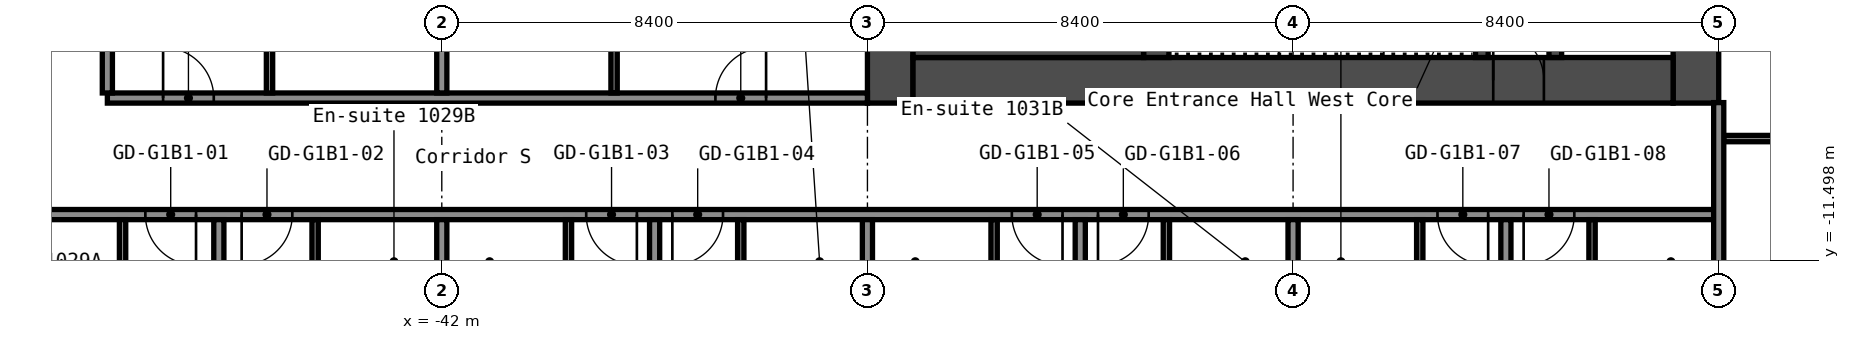
"""IFC4 building model, lengths in metres.
Left out: names, types, materials, properties, quantities, classifications, styles, units other than length and angle.
Written with IfcOpenShell. Run it as: python <this file> out.ifc"""

import sys

from ifc_helpers import new_model, si_unit, direction, frame, frame_2d, origin, place, context, subcontext, project, spatial, rectangle, extrude, element, fill, save


model = new_model("IFC4")
c1 = context("Model", 3, precision=1e-05, world=origin(), true_north=direction((0.0, 1.0)))
c2 = subcontext(c1, "Body", "Model", "MODEL_VIEW")
j1 = project(units=[si_unit("LENGTHUNIT", "METRE"), si_unit("PLANEANGLEUNIT", "RADIAN")], contexts=[c1])
p1 = place(None, origin())
s1 = spatial("IfcSite", under=j1, at=p1, CompositionType="ELEMENT")
p2 = place(p1, origin())
s2 = spatial("IfcBuilding", under=s1, at=p2, CompositionType="ELEMENT")
p3 = place(p2, frame((0.0, 0.0, 39.0)))
s3 = spatial("IfcBuildingStorey", under=s2, at=p3, CompositionType="ELEMENT", Elevation=39.0)
p4 = place(p3, frame((-17.25, -8.4, 0.0), z_axis=(0.0, 0.0, 1.0), x_axis=(0.0, 1.0, 0.0)))
e1 = element("IfcWall", 1, at=p4, inside=s3, PredefinedType="SHEAR", context=c2, shape_type="SweptSolid", body=[
    extrude(rectangle(XDim=16.8, YDim=0.9, at=frame_2d((8.4, 0.0))), origin(), (0.0, 0.0, 1.0), 2.8),
])
p5 = place(p4, frame((12.75, 0.0, 0.0)))
e2 = element("IfcOpeningElement", 2, at=p5, cuts=e1, PredefinedType="OPENING", context=c2, shape_type="SweptSolid", body=[
    extrude(rectangle(XDim=1.2, YDim=2.1, at=frame_2d((0.6, 1.05))), frame((0.0, 0.46, 0.0), z_axis=(0.0, -1.0, 0.0), x_axis=(1.0, 0.0, 0.0)), (0.0, 0.0, 1.0), 0.92),
])
p6 = place(p4, frame((2.85, 0.0, 0.0)))
e3 = element("IfcOpeningElement", 3, at=p6, cuts=e1, PredefinedType="OPENING", context=c2, shape_type="SweptSolid", body=[
    extrude(rectangle(XDim=1.2, YDim=2.1, at=frame_2d((0.6, 1.05))), frame((0.0, 0.46, 0.0), z_axis=(0.0, -1.0, 0.0), x_axis=(1.0, 0.0, 0.0)), (0.0, 0.0, 1.0), 0.92),
])
p7 = place(p3, frame((-33.15, -8.4, 0.0), z_axis=(0.0, 0.0, 1.0), x_axis=(0.0, 1.0, 0.0)))
e4 = element("IfcWall", 4, at=p7, inside=s3, PredefinedType="SHEAR", context=c2, shape_type="SweptSolid", body=[
    extrude(rectangle(XDim=16.8, YDim=0.9, at=frame_2d((8.4, 0.0))), origin(), (0.0, 0.0, 1.0), 2.8),
])
p8 = place(p3, frame((-32.7, -7.95, 0.0), z_axis=(0.0, 0.0, 1.0), x_axis=(1.0, 0.0, 0.0)))
e5 = element("IfcWall", 5, at=p8, inside=s3, PredefinedType="SHEAR", context=c2, shape_type="SweptSolid", body=[
    extrude(rectangle(XDim=15.0, YDim=0.9, at=frame_2d((7.5, 0.0))), origin(), (0.0, 0.0, 1.0), 2.8),
])
p9 = place(p8, frame((11.45, 0.0, 0.0)))
e6 = element("IfcOpeningElement", 6, at=p9, cuts=e5, PredefinedType="OPENING", context=c2, shape_type="SweptSolid", body=[
    extrude(rectangle(XDim=1.0, YDim=2.1, at=frame_2d((0.5, 1.05))), frame((0.0, 0.46, 0.0), z_axis=(0.0, -1.0, 0.0), x_axis=(1.0, 0.0, 0.0)), (0.0, 0.0, 1.0), 0.92),
])
p10 = place(p3, frame((-20.025, -7.5, 0.0), z_axis=(0.0, 0.0, 1.0), x_axis=(0.0, 1.0, 0.0)))
e7 = element("IfcWall", 7, at=p10, inside=s3, PredefinedType="SHEAR", context=c2, shape_type="SweptSolid", body=[
    extrude(rectangle(XDim=6.3, YDim=0.25, at=frame_2d((3.15, 0.0))), origin(), (0.0, 0.0, 1.0), 2.8),
])
p11 = place(p10, frame((2.4, 0.0, 0.0)))
e8 = element("IfcOpeningElement", 8, at=p11, cuts=e7, PredefinedType="OPENING", context=c2, shape_type="SweptSolid", body=[
    extrude(rectangle(XDim=1.0, YDim=2.1, at=frame_2d((0.5, 1.05))), frame((0.0, 0.135, 0.0), z_axis=(0.0, -1.0, 0.0), x_axis=(1.0, 0.0, 0.0)), (0.0, 0.0, 1.0), 0.27),
])
p12 = place(p3, frame((-21.475, -7.5, 0.0), z_axis=(0.0, 0.0, 1.0), x_axis=(0.0, 1.0, 0.0)))
e9 = element("IfcWall", 9, at=p12, inside=s3, PredefinedType="SHEAR", context=c2, shape_type="SweptSolid", body=[
    extrude(rectangle(XDim=3.75, YDim=0.25, at=frame_2d((1.875, 0.0))), origin(), (0.0, 0.0, 1.0), 2.8),
])
p13 = place(p12, frame((1.3, 0.0, 0.0)))
e10 = element("IfcOpeningElement", 10, at=p13, cuts=e9, PredefinedType="OPENING", context=c2, shape_type="SweptSolid", body=[
    extrude(rectangle(XDim=1.2, YDim=2.1, at=frame_2d((0.6, 1.05))), frame((0.0, 0.135, 0.0), z_axis=(0.0, -1.0, 0.0), x_axis=(1.0, 0.0, 0.0)), (0.0, 0.0, 1.0), 0.27),
])
p14 = place(p3, frame((-27.9, -7.5, 0.0), z_axis=(0.0, 0.0, 1.0), x_axis=(0.0, 1.0, 0.0)))
e11 = element("IfcWall", 11, at=p14, inside=s3, PredefinedType="SHEAR", context=c2, shape_type="SweptSolid", body=[
    extrude(rectangle(XDim=3.75, YDim=0.5, at=frame_2d((1.875, 0.0))), origin(), (0.0, 0.0, 1.0), 2.8),
])
p15 = place(p3, frame((-32.7, -6.75, 0.0), z_axis=(0.0, 0.0, 1.0), x_axis=(1.0, 0.0, 0.0)))
e12 = element("IfcWall", 12, at=p15, inside=s3, PredefinedType="SHEAR", context=c2, shape_type="SweptSolid", body=[
    extrude(rectangle(XDim=4.55, YDim=1.5, at=frame_2d((2.275, 0.0))), origin(), (0.0, 0.0, 1.0), 2.8),
])
p16 = place(p3, frame((-51.1, -10.6, 0.0), z_axis=(0.0, 0.0, 1.0), x_axis=(1.0, 0.0, 0.0)))
e13 = element("IfcWall", 13, at=p16, inside=s3, PredefinedType="PARTITIONING", context=c2, shape_type="SweptSolid", body=[
    extrude(rectangle(XDim=34.3, YDim=0.2, at=frame_2d((17.15, 0.0))), origin(), (0.0, 0.0, 1.0), 2.8),
])
p17 = place(p16, frame((3.25, 0.0, 0.0)))
e14 = element("IfcOpeningElement", 14, at=p17, cuts=e13, PredefinedType="OPENING", context=c2, shape_type="SweptSolid", body=[
    extrude(rectangle(XDim=1.0, YDim=2.1, at=frame_2d((0.5, 1.05))), frame((0.0, 0.11, 0.0), z_axis=(0.0, -1.0, 0.0), x_axis=(1.0, 0.0, 0.0)), (0.0, 0.0, 1.0), 0.22),
])
p18 = place(p16, frame((5.15, 0.0, 0.0)))
e15 = element("IfcOpeningElement", 15, at=p18, cuts=e13, PredefinedType="OPENING", context=c2, shape_type="SweptSolid", body=[
    extrude(rectangle(XDim=1.0, YDim=2.1, at=frame_2d((0.5, 1.05))), frame((0.0, 0.11, 0.0), z_axis=(0.0, -1.0, 0.0), x_axis=(1.0, 0.0, 0.0)), (0.0, 0.0, 1.0), 0.22),
])
p19 = place(p16, frame((11.95, 0.0, 0.0)))
e16 = element("IfcOpeningElement", 16, at=p19, cuts=e13, PredefinedType="OPENING", context=c2, shape_type="SweptSolid", body=[
    extrude(rectangle(XDim=1.0, YDim=2.1, at=frame_2d((0.5, 1.05))), frame((0.0, 0.11, 0.0), z_axis=(0.0, -1.0, 0.0), x_axis=(1.0, 0.0, 0.0)), (0.0, 0.0, 1.0), 0.22),
])
p20 = place(p16, frame((13.65, 0.0, 0.0)))
e17 = element("IfcOpeningElement", 17, at=p20, cuts=e13, PredefinedType="OPENING", context=c2, shape_type="SweptSolid", body=[
    extrude(rectangle(XDim=1.0, YDim=2.1, at=frame_2d((0.5, 1.05))), frame((0.0, 0.11, 0.0), z_axis=(0.0, -1.0, 0.0), x_axis=(1.0, 0.0, 0.0)), (0.0, 0.0, 1.0), 0.22),
])
p21 = place(p16, frame((20.35, 0.0, 0.0)))
e18 = element("IfcOpeningElement", 18, at=p21, cuts=e13, PredefinedType="OPENING", context=c2, shape_type="SweptSolid", body=[
    extrude(rectangle(XDim=1.0, YDim=2.1, at=frame_2d((0.5, 1.05))), frame((0.0, 0.11, 0.0), z_axis=(0.0, -1.0, 0.0), x_axis=(1.0, 0.0, 0.0)), (0.0, 0.0, 1.0), 0.22),
])
p22 = place(p16, frame((22.05, 0.0, 0.0)))
e19 = element("IfcOpeningElement", 19, at=p22, cuts=e13, PredefinedType="OPENING", context=c2, shape_type="SweptSolid", body=[
    extrude(rectangle(XDim=1.0, YDim=2.1, at=frame_2d((0.5, 1.05))), frame((0.0, 0.11, 0.0), z_axis=(0.0, -1.0, 0.0), x_axis=(1.0, 0.0, 0.0)), (0.0, 0.0, 1.0), 0.22),
])
p23 = place(p16, frame((28.75, 0.0, 0.0)))
e20 = element("IfcOpeningElement", 20, at=p23, cuts=e13, PredefinedType="OPENING", context=c2, shape_type="SweptSolid", body=[
    extrude(rectangle(XDim=1.0, YDim=2.1, at=frame_2d((0.5, 1.05))), frame((0.0, 0.11, 0.0), z_axis=(0.0, -1.0, 0.0), x_axis=(1.0, 0.0, 0.0)), (0.0, 0.0, 1.0), 0.22),
])
p24 = place(p16, frame((30.45, 0.0, 0.0)))
e21 = element("IfcOpeningElement", 21, at=p24, cuts=e13, PredefinedType="OPENING", context=c2, shape_type="SweptSolid", body=[
    extrude(rectangle(XDim=1.0, YDim=2.1, at=frame_2d((0.5, 1.05))), frame((0.0, 0.11, 0.0), z_axis=(0.0, -1.0, 0.0), x_axis=(1.0, 0.0, 0.0)), (0.0, 0.0, 1.0), 0.22),
])
p25 = place(p3, frame((-16.7, -9.1, 0.0), z_axis=(0.0, 0.0, 1.0), x_axis=(1.0, 0.0, 0.0)))
e22 = element("IfcWall", 22, at=p25, inside=s3, PredefinedType="PARTITIONING", context=c2, shape_type="SweptSolid", body=[
    extrude(rectangle(XDim=2.337, YDim=0.125, at=frame_2d((1.169, 0.0))), origin(), (0.0, 0.0, 1.0), 2.8),
])
p26 = place(p3, frame((-48.6, -8.3, 0.0), z_axis=(0.0, 0.0, 1.0), x_axis=(1.0, 0.0, 0.0)))
e23 = element("IfcWall", 23, at=p26, inside=s3, PredefinedType="PARTITIONING", context=c2, shape_type="SweptSolid", body=[
    extrude(rectangle(XDim=15.0, YDim=0.2, at=frame_2d((7.5, 0.0))), origin(), (0.0, 0.0, 1.0), 2.8),
])
p27 = place(p26, frame((1.1, 0.0, 0.0)))
e24 = element("IfcOpeningElement", 24, at=p27, cuts=e23, PredefinedType="OPENING", context=c2, shape_type="SweptSolid", body=[
    extrude(rectangle(XDim=1.0, YDim=2.1, at=frame_2d((0.5, 1.05))), frame((0.0, 0.11, 0.0), z_axis=(0.0, -1.0, 0.0), x_axis=(1.0, 0.0, 0.0)), (0.0, 0.0, 1.0), 0.22),
])
p28 = place(p26, frame((12.0, 0.0, 0.0)))
e25 = element("IfcOpeningElement", 25, at=p28, cuts=e23, PredefinedType="OPENING", context=c2, shape_type="SweptSolid", body=[
    extrude(rectangle(XDim=1.0, YDim=2.1, at=frame_2d((0.5, 1.05))), frame((0.0, 0.11, 0.0), z_axis=(0.0, -1.0, 0.0), x_axis=(1.0, 0.0, 0.0)), (0.0, 0.0, 1.0), 0.22),
])
p29 = place(p3, frame((-48.6, -8.2, 0.0), z_axis=(0.0, 0.0, 1.0), x_axis=(0.0, 1.0, 0.0)))
e26 = element("IfcWall", 26, at=p29, inside=s3, PredefinedType="PARTITIONING", context=c2, shape_type="SweptSolid", body=[
    extrude(rectangle(XDim=16.4, YDim=0.2, at=frame_2d((8.2, 0.0))), origin(), (0.0, 0.0, 1.0), 2.8),
])
p30 = place(p3, frame((-48.3, -13.6, 0.0), z_axis=(0.0, 0.0, 1.0), x_axis=(0.0, 1.0, 0.0)))
e27 = element("IfcWall", 27, at=p30, inside=s3, PredefinedType="PARTITIONING", context=c2, shape_type="SweptSolid", body=[
    extrude(rectangle(XDim=2.9, YDim=0.125, at=frame_2d((1.45, 0.0))), origin(), (0.0, 0.0, 1.0), 2.8),
])
p31 = place(p30, frame((0.6, 0.0, 0.0)))
e28 = element("IfcOpeningElement", 28, at=p31, cuts=e27, PredefinedType="OPENING", context=c2, shape_type="SweptSolid", body=[
    extrude(rectangle(XDim=0.8, YDim=2.1, at=frame_2d((0.4, 1.05))), frame((0.0, 0.073, 0.0), z_axis=(0.0, -1.0, 0.0), x_axis=(1.0, 0.0, 0.0)), (0.0, 0.0, 1.0), 0.145),
])
p32 = place(p3, frame((-46.4, -20.3, 0.0), z_axis=(0.0, 0.0, 1.0), x_axis=(0.0, 1.0, 0.0)))
e29 = element("IfcWall", 29, at=p32, inside=s3, PredefinedType="PARTITIONING", context=c2, shape_type="SweptSolid", body=[
    extrude(rectangle(XDim=9.6, YDim=0.2, at=frame_2d((4.8, 0.0))), origin(), (0.0, 0.0, 1.0), 2.8),
])
p33 = place(p3, frame((-45.4, -8.2, 0.0), z_axis=(0.0, 0.0, 1.0), x_axis=(0.0, 1.0, 0.0)))
e30 = element("IfcWall", 30, at=p33, inside=s3, PredefinedType="PARTITIONING", context=c2, shape_type="SweptSolid", body=[
    extrude(rectangle(XDim=3.3, YDim=0.125, at=frame_2d((1.65, 0.0))), origin(), (0.0, 0.0, 1.0), 2.8),
])
p34 = place(p3, frame((-44.5, -13.6, 0.0), z_axis=(0.0, 0.0, 1.0), x_axis=(0.0, 1.0, 0.0)))
e31 = element("IfcWall", 31, at=p34, inside=s3, PredefinedType="PARTITIONING", context=c2, shape_type="SweptSolid", body=[
    extrude(rectangle(XDim=2.9, YDim=0.125, at=frame_2d((1.45, 0.0))), origin(), (0.0, 0.0, 1.0), 2.8),
])
p35 = place(p34, frame((0.6, 0.0, 0.0)))
e32 = element("IfcOpeningElement", 32, at=p35, cuts=e31, PredefinedType="OPENING", context=c2, shape_type="SweptSolid", body=[
    extrude(rectangle(XDim=0.8, YDim=2.1, at=frame_2d((0.4, 1.05))), frame((0.0, 0.073, 0.0), z_axis=(0.0, -1.0, 0.0), x_axis=(1.0, 0.0, 0.0)), (0.0, 0.0, 1.0), 0.145),
])
p36 = place(p3, frame((-42.0, -20.3, 0.0), z_axis=(0.0, 0.0, 1.0), x_axis=(0.0, 1.0, 0.0)))
e33 = element("IfcWall", 33, at=p36, inside=s3, PredefinedType="PARTITIONING", context=c2, shape_type="SweptSolid", body=[
    extrude(rectangle(XDim=9.6, YDim=0.2, at=frame_2d((4.8, 0.0))), origin(), (0.0, 0.0, 1.0), 2.8),
])
p37 = place(p3, frame((-42.0, -8.2, 0.0), z_axis=(0.0, 0.0, 1.0), x_axis=(0.0, 1.0, 0.0)))
e34 = element("IfcWall", 34, at=p37, inside=s3, PredefinedType="PARTITIONING", context=c2, shape_type="SweptSolid", body=[
    extrude(rectangle(XDim=8.2, YDim=0.2, at=frame_2d((4.1, 0.0))), origin(), (0.0, 0.0, 1.0), 2.8),
])
p38 = place(p3, frame((-39.5, -13.6, 0.0), z_axis=(0.0, 0.0, 1.0), x_axis=(0.0, 1.0, 0.0)))
e35 = element("IfcWall", 35, at=p38, inside=s3, PredefinedType="PARTITIONING", context=c2, shape_type="SweptSolid", body=[
    extrude(rectangle(XDim=2.9, YDim=0.125, at=frame_2d((1.45, 0.0))), origin(), (0.0, 0.0, 1.0), 2.8),
])
p39 = place(p38, frame((0.6, 0.0, 0.0)))
e36 = element("IfcOpeningElement", 36, at=p39, cuts=e35, PredefinedType="OPENING", context=c2, shape_type="SweptSolid", body=[
    extrude(rectangle(XDim=0.8, YDim=2.1, at=frame_2d((0.4, 1.05))), frame((0.0, 0.073, 0.0), z_axis=(0.0, -1.0, 0.0), x_axis=(1.0, 0.0, 0.0)), (0.0, 0.0, 1.0), 0.145),
])
p40 = place(p3, frame((-38.6, -8.2, 0.0), z_axis=(0.0, 0.0, 1.0), x_axis=(0.0, 1.0, 0.0)))
e37 = element("IfcWall", 37, at=p40, inside=s3, PredefinedType="PARTITIONING", context=c2, shape_type="SweptSolid", body=[
    extrude(rectangle(XDim=3.3, YDim=0.125, at=frame_2d((1.65, 0.0))), origin(), (0.0, 0.0, 1.0), 2.8),
])
p41 = place(p3, frame((-37.8, -20.3, 0.0), z_axis=(0.0, 0.0, 1.0), x_axis=(0.0, 1.0, 0.0)))
e38 = element("IfcWall", 38, at=p41, inside=s3, PredefinedType="PARTITIONING", context=c2, shape_type="SweptSolid", body=[
    extrude(rectangle(XDim=9.6, YDim=0.2, at=frame_2d((4.8, 0.0))), origin(), (0.0, 0.0, 1.0), 2.8),
])
p42 = place(p3, frame((-36.1, -13.6, 0.0), z_axis=(0.0, 0.0, 1.0), x_axis=(0.0, 1.0, 0.0)))
e39 = element("IfcWall", 39, at=p42, inside=s3, PredefinedType="PARTITIONING", context=c2, shape_type="SweptSolid", body=[
    extrude(rectangle(XDim=2.9, YDim=0.125, at=frame_2d((1.45, 0.0))), origin(), (0.0, 0.0, 1.0), 2.8),
])
p43 = place(p42, frame((0.6, 0.0, 0.0)))
e40 = element("IfcOpeningElement", 40, at=p43, cuts=e39, PredefinedType="OPENING", context=c2, shape_type="SweptSolid", body=[
    extrude(rectangle(XDim=0.8, YDim=2.1, at=frame_2d((0.4, 1.05))), frame((0.0, 0.073, 0.0), z_axis=(0.0, -1.0, 0.0), x_axis=(1.0, 0.0, 0.0)), (0.0, 0.0, 1.0), 0.145),
])
p44 = place(p3, frame((-33.6, -20.3, 0.0), z_axis=(0.0, 0.0, 1.0), x_axis=(0.0, 1.0, 0.0)))
e41 = element("IfcWall", 41, at=p44, inside=s3, PredefinedType="PARTITIONING", context=c2, shape_type="SweptSolid", body=[
    extrude(rectangle(XDim=9.6, YDim=0.2, at=frame_2d((4.8, 0.0))), origin(), (0.0, 0.0, 1.0), 2.8),
])
p45 = place(p3, frame((-31.1, -13.6, 0.0), z_axis=(0.0, 0.0, 1.0), x_axis=(0.0, 1.0, 0.0)))
e42 = element("IfcWall", 42, at=p45, inside=s3, PredefinedType="PARTITIONING", context=c2, shape_type="SweptSolid", body=[
    extrude(rectangle(XDim=2.9, YDim=0.125, at=frame_2d((1.45, 0.0))), origin(), (0.0, 0.0, 1.0), 2.8),
])
p46 = place(p45, frame((0.6, 0.0, 0.0)))
e43 = element("IfcOpeningElement", 43, at=p46, cuts=e42, PredefinedType="OPENING", context=c2, shape_type="SweptSolid", body=[
    extrude(rectangle(XDim=0.8, YDim=2.1, at=frame_2d((0.4, 1.05))), frame((0.0, 0.073, 0.0), z_axis=(0.0, -1.0, 0.0), x_axis=(1.0, 0.0, 0.0)), (0.0, 0.0, 1.0), 0.145),
])
p47 = place(p3, frame((-29.4, -20.3, 0.0), z_axis=(0.0, 0.0, 1.0), x_axis=(0.0, 1.0, 0.0)))
e44 = element("IfcWall", 44, at=p47, inside=s3, PredefinedType="PARTITIONING", context=c2, shape_type="SweptSolid", body=[
    extrude(rectangle(XDim=9.6, YDim=0.2, at=frame_2d((4.8, 0.0))), origin(), (0.0, 0.0, 1.0), 2.8),
])
p48 = place(p3, frame((-27.7, -13.6, 0.0), z_axis=(0.0, 0.0, 1.0), x_axis=(0.0, 1.0, 0.0)))
e45 = element("IfcWall", 45, at=p48, inside=s3, PredefinedType="PARTITIONING", context=c2, shape_type="SweptSolid", body=[
    extrude(rectangle(XDim=2.9, YDim=0.125, at=frame_2d((1.45, 0.0))), origin(), (0.0, 0.0, 1.0), 2.8),
])
p49 = place(p48, frame((0.6, 0.0, 0.0)))
e46 = element("IfcOpeningElement", 46, at=p49, cuts=e45, PredefinedType="OPENING", context=c2, shape_type="SweptSolid", body=[
    extrude(rectangle(XDim=0.8, YDim=2.1, at=frame_2d((0.4, 1.05))), frame((0.0, 0.073, 0.0), z_axis=(0.0, -1.0, 0.0), x_axis=(1.0, 0.0, 0.0)), (0.0, 0.0, 1.0), 0.145),
])
p50 = place(p3, frame((-25.2, -20.3, 0.0), z_axis=(0.0, 0.0, 1.0), x_axis=(0.0, 1.0, 0.0)))
e47 = element("IfcWall", 47, at=p50, inside=s3, PredefinedType="PARTITIONING", context=c2, shape_type="SweptSolid", body=[
    extrude(rectangle(XDim=9.6, YDim=0.2, at=frame_2d((4.8, 0.0))), origin(), (0.0, 0.0, 1.0), 2.8),
])
p51 = place(p3, frame((-22.7, -13.6, 0.0), z_axis=(0.0, 0.0, 1.0), x_axis=(0.0, 1.0, 0.0)))
e48 = element("IfcWall", 48, at=p51, inside=s3, PredefinedType="PARTITIONING", context=c2, shape_type="SweptSolid", body=[
    extrude(rectangle(XDim=2.9, YDim=0.125, at=frame_2d((1.45, 0.0))), origin(), (0.0, 0.0, 1.0), 2.8),
])
p52 = place(p51, frame((0.6, 0.0, 0.0)))
e49 = element("IfcOpeningElement", 49, at=p52, cuts=e48, PredefinedType="OPENING", context=c2, shape_type="SweptSolid", body=[
    extrude(rectangle(XDim=0.8, YDim=2.1, at=frame_2d((0.4, 1.05))), frame((0.0, 0.073, 0.0), z_axis=(0.0, -1.0, 0.0), x_axis=(1.0, 0.0, 0.0)), (0.0, 0.0, 1.0), 0.145),
])
p53 = place(p3, frame((-21.0, -20.3, 0.0), z_axis=(0.0, 0.0, 1.0), x_axis=(0.0, 1.0, 0.0)))
e50 = element("IfcWall", 50, at=p53, inside=s3, PredefinedType="PARTITIONING", context=c2, shape_type="SweptSolid", body=[
    extrude(rectangle(XDim=9.6, YDim=0.2, at=frame_2d((4.8, 0.0))), origin(), (0.0, 0.0, 1.0), 2.8),
])
p54 = place(p3, frame((-19.3, -13.6, 0.0), z_axis=(0.0, 0.0, 1.0), x_axis=(0.0, 1.0, 0.0)))
e51 = element("IfcWall", 51, at=p54, inside=s3, PredefinedType="PARTITIONING", context=c2, shape_type="SweptSolid", body=[
    extrude(rectangle(XDim=2.9, YDim=0.125, at=frame_2d((1.45, 0.0))), origin(), (0.0, 0.0, 1.0), 2.8),
])
p55 = place(p54, frame((0.6, 0.0, 0.0)))
e52 = element("IfcOpeningElement", 52, at=p55, cuts=e51, PredefinedType="OPENING", context=c2, shape_type="SweptSolid", body=[
    extrude(rectangle(XDim=0.8, YDim=2.1, at=frame_2d((0.4, 1.05))), frame((0.0, 0.073, 0.0), z_axis=(0.0, -1.0, 0.0), x_axis=(1.0, 0.0, 0.0)), (0.0, 0.0, 1.0), 0.145),
])
p56 = place(p3, frame((-16.8, -20.3, 0.0), z_axis=(0.0, 0.0, 1.0), x_axis=(0.0, 1.0, 0.0)))
e53 = element("IfcWall", 53, at=p56, inside=s3, PredefinedType="PARTITIONING", context=c2, shape_type="SweptSolid", body=[
    extrude(rectangle(XDim=11.91, YDim=0.2, at=frame_2d((5.955, 0.0))), origin(), (0.0, 0.0, 1.0), 2.8),
])
p57 = place(p9, origin())
e54 = element("IfcDoor", 54, at=p57, inside=s3, OperationType="SINGLE_SWING_RIGHT", PredefinedType="DOOR", context=c2, shape_type="SweptSolid", body=[
    extrude(rectangle(XDim=1.0, YDim=2.1, at=frame_2d((0.5, 1.05))), frame((0.0, 0.025, 0.0), z_axis=(0.0, -1.0, 0.0), x_axis=(1.0, 0.0, 0.0)), (0.0, 0.0, 1.0), 0.05),
])
fill(e6, e54)
p58 = place(p17, origin())
e55 = element("IfcDoor", 55, at=p58, inside=s3, OperationType="SINGLE_SWING_RIGHT", PredefinedType="DOOR", context=c2, shape_type="SweptSolid", body=[
    extrude(rectangle(XDim=1.0, YDim=2.1, at=frame_2d((0.5, 1.05))), frame((0.0, 0.025, 0.0), z_axis=(0.0, -1.0, 0.0), x_axis=(1.0, 0.0, 0.0)), (0.0, 0.0, 1.0), 0.05),
])
fill(e14, e55)
p59 = place(p18, origin())
e56 = element("IfcDoor", 56, at=p59, inside=s3, OperationType="SINGLE_SWING_LEFT", PredefinedType="DOOR", context=c2, shape_type="SweptSolid", body=[
    extrude(rectangle(XDim=1.0, YDim=2.1, at=frame_2d((0.5, 1.05))), frame((0.0, 0.025, 0.0), z_axis=(0.0, -1.0, 0.0), x_axis=(1.0, 0.0, 0.0)), (0.0, 0.0, 1.0), 0.05),
])
fill(e15, e56)
p60 = place(p19, origin())
e57 = element("IfcDoor", 57, at=p60, inside=s3, OperationType="SINGLE_SWING_RIGHT", PredefinedType="DOOR", context=c2, shape_type="SweptSolid", body=[
    extrude(rectangle(XDim=1.0, YDim=2.1, at=frame_2d((0.5, 1.05))), frame((0.0, 0.025, 0.0), z_axis=(0.0, -1.0, 0.0), x_axis=(1.0, 0.0, 0.0)), (0.0, 0.0, 1.0), 0.05),
])
fill(e16, e57)
p61 = place(p20, origin())
e58 = element("IfcDoor", 58, at=p61, inside=s3, OperationType="SINGLE_SWING_LEFT", PredefinedType="DOOR", context=c2, shape_type="SweptSolid", body=[
    extrude(rectangle(XDim=1.0, YDim=2.1, at=frame_2d((0.5, 1.05))), frame((0.0, 0.025, 0.0), z_axis=(0.0, -1.0, 0.0), x_axis=(1.0, 0.0, 0.0)), (0.0, 0.0, 1.0), 0.05),
])
fill(e17, e58)
p62 = place(p21, origin())
e59 = element("IfcDoor", 59, at=p62, inside=s3, OperationType="SINGLE_SWING_RIGHT", PredefinedType="DOOR", context=c2, shape_type="SweptSolid", body=[
    extrude(rectangle(XDim=1.0, YDim=2.1, at=frame_2d((0.5, 1.05))), frame((0.0, 0.025, 0.0), z_axis=(0.0, -1.0, 0.0), x_axis=(1.0, 0.0, 0.0)), (0.0, 0.0, 1.0), 0.05),
])
fill(e18, e59)
p63 = place(p22, origin())
e60 = element("IfcDoor", 60, at=p63, inside=s3, OperationType="SINGLE_SWING_LEFT", PredefinedType="DOOR", context=c2, shape_type="SweptSolid", body=[
    extrude(rectangle(XDim=1.0, YDim=2.1, at=frame_2d((0.5, 1.05))), frame((0.0, 0.025, 0.0), z_axis=(0.0, -1.0, 0.0), x_axis=(1.0, 0.0, 0.0)), (0.0, 0.0, 1.0), 0.05),
])
fill(e19, e60)
p64 = place(p23, origin())
e61 = element("IfcDoor", 61, at=p64, inside=s3, OperationType="SINGLE_SWING_RIGHT", PredefinedType="DOOR", context=c2, shape_type="SweptSolid", body=[
    extrude(rectangle(XDim=1.0, YDim=2.1, at=frame_2d((0.5, 1.05))), frame((0.0, 0.025, 0.0), z_axis=(0.0, -1.0, 0.0), x_axis=(1.0, 0.0, 0.0)), (0.0, 0.0, 1.0), 0.05),
])
fill(e20, e61)
p65 = place(p24, origin())
e62 = element("IfcDoor", 62, at=p65, inside=s3, OperationType="SINGLE_SWING_LEFT", PredefinedType="DOOR", context=c2, shape_type="SweptSolid", body=[
    extrude(rectangle(XDim=1.0, YDim=2.1, at=frame_2d((0.5, 1.05))), frame((0.0, 0.025, 0.0), z_axis=(0.0, -1.0, 0.0), x_axis=(1.0, 0.0, 0.0)), (0.0, 0.0, 1.0), 0.05),
])
fill(e21, e62)
p66 = place(p27, origin())
e63 = element("IfcDoor", 63, at=p66, inside=s3, OperationType="SINGLE_SWING_RIGHT", PredefinedType="DOOR", context=c2, shape_type="SweptSolid", body=[
    extrude(rectangle(XDim=1.0, YDim=2.1, at=frame_2d((0.5, 1.05))), frame((0.0, 0.025, 0.0), z_axis=(0.0, -1.0, 0.0), x_axis=(1.0, 0.0, 0.0)), (0.0, 0.0, 1.0), 0.05),
])
fill(e24, e63)
p67 = place(p28, origin())
e64 = element("IfcDoor", 64, at=p67, inside=s3, OperationType="SINGLE_SWING_LEFT", PredefinedType="DOOR", context=c2, shape_type="SweptSolid", body=[
    extrude(rectangle(XDim=1.0, YDim=2.1, at=frame_2d((0.5, 1.05))), frame((0.0, 0.025, 0.0), z_axis=(0.0, -1.0, 0.0), x_axis=(1.0, 0.0, 0.0)), (0.0, 0.0, 1.0), 0.05),
])
fill(e25, e64)
save(model, sys.argv[1])
